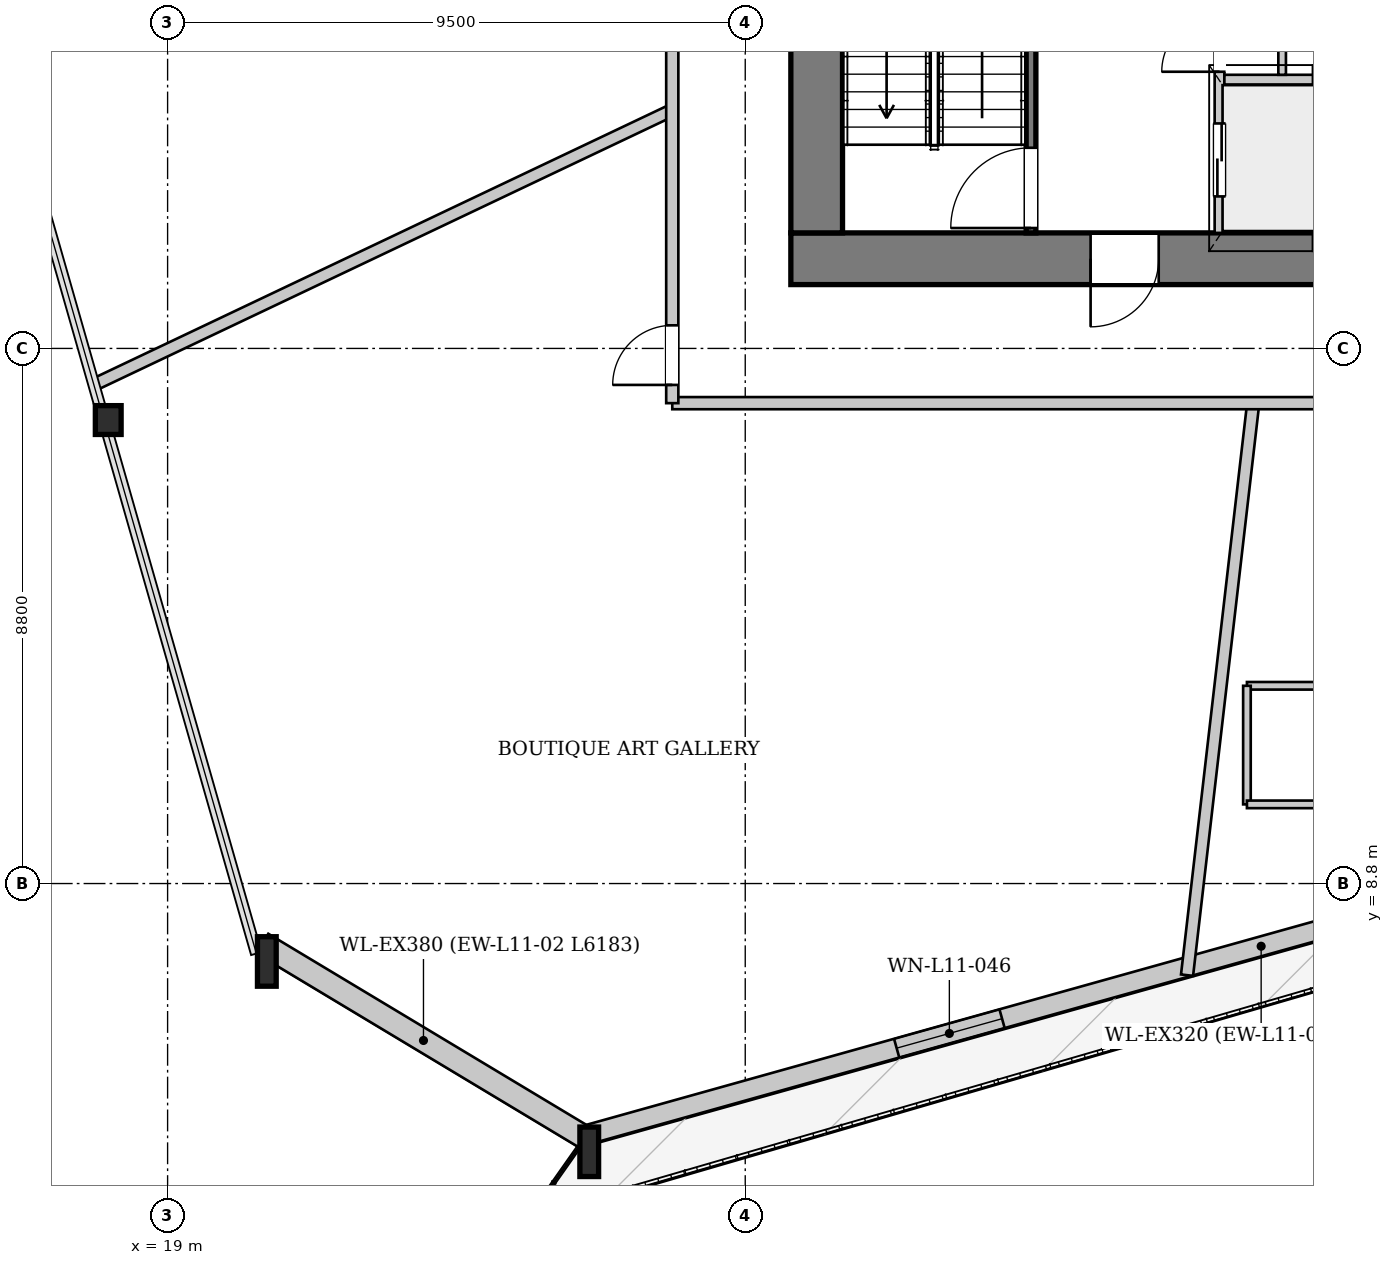
"""IFC4 building model, lengths in metres.
Left out: names, types, materials, properties, quantities, classifications, styles, units other than length and angle.
Written with IfcOpenShell. Run it as: python <this file> out.ifc"""

import sys

from ifc_helpers import new_model, si_unit, direction, frame, frame_2d, origin, origin_2d, place, context, subcontext, project, spatial, rectangle, i_section, extrude, source, transform, mapped, element, fill, save


model = new_model("IFC4")
c1 = context("Model", 3, precision=1e-05, world=origin(), true_north=direction((0.0, 1.0)))
c2 = subcontext(c1, "Body", "Model", "MODEL_VIEW")
j1 = project(units=[si_unit("LENGTHUNIT", "METRE"), si_unit("PLANEANGLEUNIT", "RADIAN")], contexts=[c1])
p1 = place(None, origin())
s1 = spatial("IfcSite", under=j1, at=p1, CompositionType="ELEMENT")
p2 = place(p1, origin())
s2 = spatial("IfcBuilding", under=s1, at=p2, CompositionType="ELEMENT")
p3 = place(p2, frame((0.0, 0.0, 47.05)))
s3 = spatial("IfcBuildingStorey", under=s2, at=p3, CompositionType="ELEMENT", Elevation=47.05)
m1 = source(origin(), c2, "Body", "SweptSolid", [
    extrude(i_section(OverallWidth=0.424, OverallDepth=0.474, WebThickness=0.043, FlangeThickness=0.068, at=origin_2d()), origin(), (0.0, 0.0, 1.0), 3.406),
])
p4 = place(p3, frame((17.909, 16.575, 0.0), z_axis=(0.067226660007, -0.089587766534, 0.993707506398), x_axis=(0.799846403286, 0.600204741026, 0.0)))
e1 = element("IfcColumn", 1, at=p4, inside=s3, PredefinedType="COLUMN", context=c2, shape_type="MappedRepresentation", body=[
    mapped(m1, transform((0.0, 0.0, 0.0), x_axis=(1.0, 0.0, 0.0), y_axis=(0.0, 1.0, 0.0), z_axis=(0.0, 0.0, 1.0), scale=1.0)),
])
m2 = source(origin(), c2, "Body", "SweptSolid", [
    extrude(i_section(OverallWidth=0.308, OverallDepth=0.814, WebThickness=0.021, FlangeThickness=0.04, at=origin_2d()), origin(), (0.0, 0.0, 1.0), 3.412),
])
p5 = place(p3, frame((20.46, 7.648, 0.0), z_axis=(0.100596245747, -0.076126888674, 0.992010631073), x_axis=(0.603442670186, 0.797406385602, 0.0)))
e2 = element("IfcColumn", 2, at=p5, inside=s3, PredefinedType="COLUMN", context=c2, shape_type="MappedRepresentation", body=[
    mapped(m2, transform((0.0, 0.0, 0.0), x_axis=(1.0, 0.0, 0.0), y_axis=(0.0, 1.0, 0.0), z_axis=(0.0, 0.0, 1.0), scale=1.0)),
])
m3 = source(origin(), c2, "Body", "SweptSolid", [
    extrude(i_section(OverallWidth=0.308, OverallDepth=0.814, WebThickness=0.021, FlangeThickness=0.04, at=origin_2d()), origin(), (0.0, 0.0, 1.0), 3.406),
])
p6 = place(p3, frame((25.76, 4.464, 0.0), z_axis=(0.102280047299, -0.044223398166, 0.993772148422), x_axis=(0.396867213304, 0.91787603466, 0.0)))
e3 = element("IfcColumn", 3, at=p6, inside=s3, PredefinedType="COLUMN", context=c2, shape_type="MappedRepresentation", body=[
    mapped(m3, transform((0.0, 0.0, 0.0), x_axis=(1.0, 0.0, 0.0), y_axis=(0.0, 1.0, 0.0), z_axis=(0.0, 0.0, 1.0), scale=1.0)),
])
p7 = place(p3, frame((49.333, 11.222, 0.0), z_axis=(0.0, 0.0, 1.0), x_axis=(-0.96305403072, -0.269308250734, 0.0)))
e4 = element("IfcWall", 4, at=p7, inside=s3, PredefinedType="SOLIDWALL", context=c2, shape_type="SweptSolid", body=[
    extrude(rectangle(XDim=24.521, YDim=0.32, at=frame_2d((12.261, 0.0))), origin(), (0.0, 0.0, 1.0), 2.592),
])
p8 = place(p7, frame((7.297, 0.0, 0.0)))
e5 = element("IfcOpeningElement", 5, at=p8, cuts=e4, PredefinedType="OPENING", context=c2, shape_type="SweptSolid", body=[
    extrude(rectangle(XDim=1.1, YDim=2.3, at=frame_2d((0.55, 1.15))), frame((0.0, 0.17, 0.0), z_axis=(0.0, -1.0, 0.0), x_axis=(1.0, 0.0, 0.0)), (0.0, 0.0, 1.0), 0.34),
])
p9 = place(p7, frame((17.246, 0.0, 0.272)))
e6 = element("IfcOpeningElement", 6, at=p9, cuts=e4, PredefinedType="OPENING", context=c2, shape_type="SweptSolid", body=[
    extrude(rectangle(XDim=1.8, YDim=2.2, at=frame_2d((0.9, 1.1))), frame((0.0, 0.17, 0.0), z_axis=(0.0, -1.0, 0.0), x_axis=(1.0, 0.0, 0.0)), (0.0, 0.0, 1.0), 0.34),
])
p10 = place(p3, frame((25.858, 4.627, 0.0), z_axis=(0.0, 0.0, 1.0), x_axis=(-0.857186181791, 0.515006650196, 0.0)))
e7 = element("IfcWall", 7, at=p10, inside=s3, PredefinedType="SOLIDWALL", context=c2, shape_type="SweptSolid", body=[
    extrude(rectangle(XDim=6.183, YDim=0.38, at=frame_2d((3.092, 0.0))), origin(), (0.0, 0.0, 1.0), 2.592),
])
p11 = place(p3, frame((46.75, 19.075, 0.0), z_axis=(0.0, 0.0, 1.0), x_axis=(-1.0, 0.0, 0.0)))
e8 = element("IfcWall", 8, at=p11, inside=s3, PredefinedType="SHEAR", context=c2, shape_type="SweptSolid", body=[
    extrude(rectangle(XDim=17.5, YDim=0.85, at=frame_2d((8.75, 0.0))), origin(), (0.0, 0.0, 1.0), 3.3),
])
p12 = place(p11, frame((4.95, 0.0, 0.0)))
e9 = element("IfcOpeningElement", 9, at=p12, cuts=e8, PredefinedType="OPENING", context=c2, shape_type="SweptSolid", body=[
    extrude(rectangle(XDim=1.12, YDim=2.25, at=frame_2d((0.56, 1.125))), frame((0.0, 0.435, 0.0), z_axis=(0.0, -1.0, 0.0), x_axis=(1.0, 0.0, 0.0)), (0.0, 0.0, 1.0), 0.87),
])
p13 = place(p11, frame((11.45, 0.0, 0.0)))
e10 = element("IfcOpeningElement", 10, at=p13, cuts=e8, PredefinedType="OPENING", context=c2, shape_type="SweptSolid", body=[
    extrude(rectangle(XDim=1.12, YDim=2.25, at=frame_2d((0.56, 1.125))), frame((0.0, 0.435, 0.0), z_axis=(0.0, -1.0, 0.0), x_axis=(1.0, 0.0, 0.0)), (0.0, 0.0, 1.0), 0.87),
])
p14 = place(p3, frame((29.675, 19.5, 0.0), z_axis=(0.0, 0.0, 1.0), x_axis=(0.0, 1.0, 0.0)))
e11 = element("IfcWall", 11, at=p14, inside=s3, PredefinedType="SHEAR", context=c2, shape_type="SweptSolid", body=[
    extrude(rectangle(XDim=14.2, YDim=0.85, at=frame_2d((7.1, 0.0))), origin(), (0.0, 0.0, 1.0), 3.3),
])
p15 = place(p14, frame((7.42, 0.0, 0.0)))
e12 = element("IfcOpeningElement", 12, at=p15, cuts=e11, PredefinedType="OPENING", context=c2, shape_type="SweptSolid", body=[
    extrude(rectangle(XDim=1.6, YDim=2.2, at=frame_2d((0.8, 1.1))), frame((0.0, 0.435, 0.0), z_axis=(0.0, -1.0, 0.0), x_axis=(1.0, 0.0, 0.0)), (0.0, 0.0, 1.0), 0.87),
])
p16 = place(p3, frame((33.2, 19.5, 0.0), z_axis=(0.0, 0.0, 1.0), x_axis=(0.0, 1.0, 0.0)))
e13 = element("IfcWall", 13, at=p16, inside=s3, PredefinedType="PARTITIONING", context=c2, shape_type="SweptSolid", body=[
    extrude(rectangle(XDim=7.46, YDim=0.16, at=frame_2d((3.73, 0.0))), origin(), (0.0, 0.0, 1.0), 3.3),
])
p17 = place(p16, frame((0.08, 0.0, 0.0)))
e14 = element("IfcOpeningElement", 14, at=p17, cuts=e13, PredefinedType="OPENING", context=c2, shape_type="SweptSolid", body=[
    extrude(rectangle(XDim=1.32, YDim=2.2, at=frame_2d((0.66, 1.1))), frame((0.0, 0.09, 0.0), z_axis=(0.0, -1.0, 0.0), x_axis=(1.0, 0.0, 0.0)), (0.0, 0.0, 1.0), 0.18),
])
p18 = place(p3, frame((36.3, 19.5, 0.0), z_axis=(0.0, 0.0, 1.0), x_axis=(0.0, 1.0, 0.0)))
e15 = element("IfcWall", 15, at=p18, inside=s3, PredefinedType="PARTITIONING", context=c2, shape_type="SweptSolid", body=[
    extrude(rectangle(XDim=4.78, YDim=0.16, at=frame_2d((2.39, 0.0))), origin(), (0.0, 0.0, 1.0), 3.3),
])
p19 = place(p18, frame((0.6, 0.0, 0.0)))
e16 = element("IfcOpeningElement", 16, at=p19, cuts=e15, PredefinedType="OPENING", context=c2, shape_type="SweptSolid", body=[
    extrude(rectangle(XDim=1.2, YDim=2.2, at=frame_2d((0.6, 1.1))), frame((0.0, 0.09, 0.0), z_axis=(0.0, -1.0, 0.0), x_axis=(1.0, 0.0, 0.0)), (0.0, 0.0, 1.0), 0.18),
])
p20 = place(p18, frame((2.65, 0.0, 0.0)))
e17 = element("IfcOpeningElement", 17, at=p20, cuts=e15, PredefinedType="OPENING", context=c2, shape_type="SweptSolid", body=[
    extrude(rectangle(XDim=0.95, YDim=2.1, at=frame_2d((0.475, 1.05))), frame((0.0, 0.09, 0.0), z_axis=(0.0, -1.0, 0.0), x_axis=(1.0, 0.0, 0.0)), (0.0, 0.0, 1.0), 0.18),
])
p21 = place(p3, frame((36.38, 22.02, 0.0), z_axis=(0.0, 0.0, 1.0), x_axis=(1.0, 0.0, 0.0)))
e18 = element("IfcWall", 18, at=p21, inside=s3, PredefinedType="PARTITIONING", context=c2, shape_type="SweptSolid", body=[
    extrude(rectangle(XDim=3.24, YDim=0.16, at=frame_2d((1.62, 0.0))), origin(), (0.0, 0.0, 1.0), 3.3),
])
p22 = place(p3, frame((37.33, 22.1, 0.0), z_axis=(0.0, 0.0, 1.0), x_axis=(0.0, 1.0, 0.0)))
e19 = element("IfcWall", 19, at=p22, inside=s3, PredefinedType="PARTITIONING", context=c2, shape_type="SweptSolid", body=[
    extrude(rectangle(XDim=2.18, YDim=0.125, at=frame_2d((1.09, 0.0))), origin(), (0.0, 0.0, 1.0), 3.3),
])
p23 = place(p22, frame((0.65, 0.0, 0.0)))
e20 = element("IfcOpeningElement", 20, at=p23, cuts=e19, PredefinedType="OPENING", context=c2, shape_type="SweptSolid", body=[
    extrude(rectangle(XDim=0.9, YDim=2.1, at=frame_2d((0.45, 1.05))), frame((0.0, 0.073, 0.0), z_axis=(0.0, -1.0, 0.0), x_axis=(1.0, 0.0, 0.0)), (0.0, 0.0, 1.0), 0.145),
])
p24 = place(p3, frame((27.3, 21.519, 0.0), z_axis=(0.0, 0.0, 1.0), x_axis=(-0.90333786909, -0.428929707839, 0.0)))
e21 = element("IfcWall", 21, at=p24, inside=s3, PredefinedType="PARTITIONING", context=c2, shape_type="SweptSolid", body=[
    extrude(rectangle(XDim=10.5, YDim=0.2, at=frame_2d((5.25, 0.0))), origin(), (0.0, 0.0, 1.0), 3.3),
])
p25 = place(p3, frame((36.854, 16.7, 0.0), z_axis=(0.0, 0.0, 1.0), x_axis=(-0.11493529064, -0.993372980791, 0.0)))
e22 = element("IfcWall", 22, at=p25, inside=s3, PredefinedType="PARTITIONING", context=c2, shape_type="SweptSolid", body=[
    extrude(rectangle(XDim=9.469, YDim=0.2, at=frame_2d((4.735, 0.0))), origin(), (0.0, 0.0, 1.0), 3.3),
])
p26 = place(p3, frame((39.151, 12.052, 0.0), z_axis=(0.0, 0.0, 1.0), x_axis=(-1.0, 0.0, 0.0)))
e23 = element("IfcWall", 23, at=p26, inside=s3, PredefinedType="PARTITIONING", context=c2, shape_type="SweptSolid", body=[
    extrude(rectangle(XDim=2.4, YDim=0.125, at=frame_2d((1.2, 0.0))), origin(), (0.0, 0.0, 1.0), 2.985),
])
p27 = place(p3, frame((36.751, 12.052, 0.0), z_axis=(0.0, 0.0, 1.0), x_axis=(0.0, -1.0, 0.0)))
e24 = element("IfcWall", 24, at=p27, inside=s3, PredefinedType="PARTITIONING", context=c2, shape_type="SweptSolid", body=[
    extrude(rectangle(XDim=1.95, YDim=0.125, at=frame_2d((0.975, 0.0))), origin(), (0.0, 0.0, 1.0), 3.3),
])
p28 = place(p3, frame((36.751, 10.102, 0.0), z_axis=(0.0, 0.0, 1.0), x_axis=(1.0, 0.0, 0.0)))
e25 = element("IfcWall", 25, at=p28, inside=s3, PredefinedType="PARTITIONING", context=c2, shape_type="SweptSolid", body=[
    extrude(rectangle(XDim=2.4, YDim=0.125, at=frame_2d((1.2, 0.0))), origin(), (0.0, 0.0, 1.0), 3.3),
])
p29 = place(p3, frame((27.3, 16.7, 0.0), z_axis=(0.0, 0.0, 1.0), x_axis=(1.0, 0.0, 0.0)))
e26 = element("IfcWall", 26, at=p29, inside=s3, PredefinedType="PARTITIONING", context=c2, shape_type="SweptSolid", body=[
    extrude(rectangle(XDim=21.4, YDim=0.2, at=frame_2d((10.7, 0.0))), origin(), (0.0, 0.0, 1.0), 3.3),
])
p30 = place(p29, frame((13.944, 0.0, 0.0)))
e27 = element("IfcOpeningElement", 27, at=p30, cuts=e26, PredefinedType="OPENING", context=c2, shape_type="SweptSolid", body=[
    extrude(rectangle(XDim=0.98, YDim=2.15, at=frame_2d((0.49, 1.075))), frame((0.0, 0.11, 0.0), z_axis=(0.0, -1.0, 0.0), x_axis=(1.0, 0.0, 0.0)), (0.0, 0.0, 1.0), 0.22),
])
p31 = place(p3, frame((27.3, 16.7, 0.0), z_axis=(0.0, 0.0, 1.0), x_axis=(0.0, 1.0, 0.0)))
e28 = element("IfcWall", 28, at=p31, inside=s3, PredefinedType="PARTITIONING", context=c2, shape_type="SweptSolid", body=[
    extrude(rectangle(XDim=19.8, YDim=0.2, at=frame_2d((9.9, 0.0))), origin(), (0.0, 0.0, 1.0), 3.3),
])
p32 = place(p31, frame((18.52, 0.0, 0.0)))
e29 = element("IfcOpeningElement", 29, at=p32, cuts=e28, PredefinedType="OPENING", context=c2, shape_type="SweptSolid", body=[
    extrude(rectangle(XDim=0.98, YDim=2.15, at=frame_2d((0.49, 1.075))), frame((0.0, 0.11, 0.0), z_axis=(0.0, -1.0, 0.0), x_axis=(1.0, 0.0, 0.0)), (0.0, 0.0, 1.0), 0.22),
])
p33 = place(p31, frame((12.318, 0.0, 0.0)))
e30 = element("IfcOpeningElement", 30, at=p33, cuts=e28, PredefinedType="OPENING", context=c2, shape_type="SweptSolid", body=[
    extrude(rectangle(XDim=0.98, YDim=2.15, at=frame_2d((0.49, 1.075))), frame((0.0, 0.11, 0.0), z_axis=(0.0, -1.0, 0.0), x_axis=(1.0, 0.0, 0.0)), (0.0, 0.0, 1.0), 0.22),
])
p34 = place(p31, frame((0.3, 0.0, 0.0)))
e31 = element("IfcOpeningElement", 31, at=p34, cuts=e28, PredefinedType="OPENING", context=c2, shape_type="SweptSolid", body=[
    extrude(rectangle(XDim=0.98, YDim=2.15, at=frame_2d((0.49, 1.075))), frame((0.0, 0.11, 0.0), z_axis=(0.0, -1.0, 0.0), x_axis=(1.0, 0.0, 0.0)), (0.0, 0.0, 1.0), 0.22),
])
m4 = source(origin(), c2, "Body", "SweptSolid", [
    extrude(rectangle(XDim=1.8, YDim=2.2, at=frame_2d((0.9, 1.1))), frame((0.0, 0.03, 0.0), z_axis=(0.0, -1.0, 0.0), x_axis=(1.0, 0.0, 0.0)), (0.0, 0.0, 1.0), 0.06),
])
p35 = place(p9, origin())
e32 = element("IfcWindow", 32, at=p35, inside=s3, PartitioningType="SINGLE_PANEL", PredefinedType="WINDOW", context=c2, shape_type="MappedRepresentation", body=[
    mapped(m4, transform((0.0, 0.0, 0.0), x_axis=(1.0, 0.0, 0.0), y_axis=(0.0, 1.0, 0.0), z_axis=(0.0, 0.0, 1.0), scale=1.0)),
])
fill(e6, e32)
m5 = source(origin(), c2, "Body", "SweptSolid", [
    extrude(rectangle(XDim=1.12, YDim=2.25, at=frame_2d((0.56, 1.125))), frame((0.0, 0.025, 0.0), z_axis=(0.0, -1.0, 0.0), x_axis=(1.0, 0.0, 0.0)), (0.0, 0.0, 1.0), 0.05),
])
p36 = place(p13, origin())
e33 = element("IfcDoor", 33, at=p36, inside=s3, OperationType="SINGLE_SWING_RIGHT", PredefinedType="DOOR", context=c2, shape_type="MappedRepresentation", body=[
    mapped(m5, transform((0.0, 0.0, 0.0), x_axis=(1.0, 0.0, 0.0), y_axis=(0.0, 1.0, 0.0), z_axis=(0.0, 0.0, 1.0), scale=1.0)),
])
fill(e10, e33)
m6 = source(origin(), c2, "Body", "SweptSolid", [
    extrude(rectangle(XDim=1.32, YDim=2.2, at=frame_2d((0.66, 1.1))), frame((0.0, 0.025, 0.0), z_axis=(0.0, -1.0, 0.0), x_axis=(1.0, 0.0, 0.0)), (0.0, 0.0, 1.0), 0.05),
])
p37 = place(p17, origin())
e34 = element("IfcDoor", 34, at=p37, inside=s3, OperationType="SINGLE_SWING_LEFT", PredefinedType="DOOR", context=c2, shape_type="MappedRepresentation", body=[
    mapped(m6, transform((0.0, 0.0, 0.0), x_axis=(1.0, 0.0, 0.0), y_axis=(0.0, 1.0, 0.0), z_axis=(0.0, 0.0, 1.0), scale=1.0)),
])
fill(e14, e34)
m7 = source(origin(), c2, "Body", "SweptSolid", [
    extrude(rectangle(XDim=1.2, YDim=2.2, at=frame_2d((0.6, 1.1))), frame((0.0, 0.025, 0.0), z_axis=(0.0, -1.0, 0.0), x_axis=(1.0, 0.0, 0.0)), (0.0, 0.0, 1.0), 0.05),
])
p38 = place(p19, origin())
e35 = element("IfcDoor", 35, at=p38, inside=s3, OperationType="DOUBLE_DOOR_SLIDING", PredefinedType="DOOR", context=c2, shape_type="MappedRepresentation", body=[
    mapped(m7, transform((0.0, 0.0, 0.0), x_axis=(1.0, 0.0, 0.0), y_axis=(0.0, 1.0, 0.0), z_axis=(0.0, 0.0, 1.0), scale=1.0)),
])
fill(e16, e35)
m8 = source(origin(), c2, "Body", "SweptSolid", [
    extrude(rectangle(XDim=0.95, YDim=2.1, at=frame_2d((0.475, 1.05))), frame((0.0, 0.025, 0.0), z_axis=(0.0, -1.0, 0.0), x_axis=(1.0, 0.0, 0.0)), (0.0, 0.0, 1.0), 0.05),
])
p39 = place(p20, origin())
e36 = element("IfcDoor", 36, at=p39, inside=s3, OperationType="SINGLE_SWING_LEFT", PredefinedType="DOOR", context=c2, shape_type="MappedRepresentation", body=[
    mapped(m8, transform((0.0, 0.0, 0.0), x_axis=(1.0, 0.0, 0.0), y_axis=(0.0, 1.0, 0.0), z_axis=(0.0, 0.0, 1.0), scale=1.0)),
])
fill(e17, e36)
m9 = source(origin(), c2, "Body", "SweptSolid", [
    extrude(rectangle(XDim=0.98, YDim=2.15, at=frame_2d((0.49, 1.075))), frame((0.0, 0.025, 0.0), z_axis=(0.0, -1.0, 0.0), x_axis=(1.0, 0.0, 0.0)), (0.0, 0.0, 1.0), 0.05),
])
p40 = place(p34, origin())
e37 = element("IfcDoor", 37, at=p40, inside=s3, OperationType="SINGLE_SWING_LEFT", PredefinedType="DOOR", context=c2, shape_type="MappedRepresentation", body=[
    mapped(m9, transform((0.0, 0.0, 0.0), x_axis=(1.0, 0.0, 0.0), y_axis=(0.0, 1.0, 0.0), z_axis=(0.0, 0.0, 1.0), scale=1.0)),
])
fill(e31, e37)
save(model, sys.argv[1])
